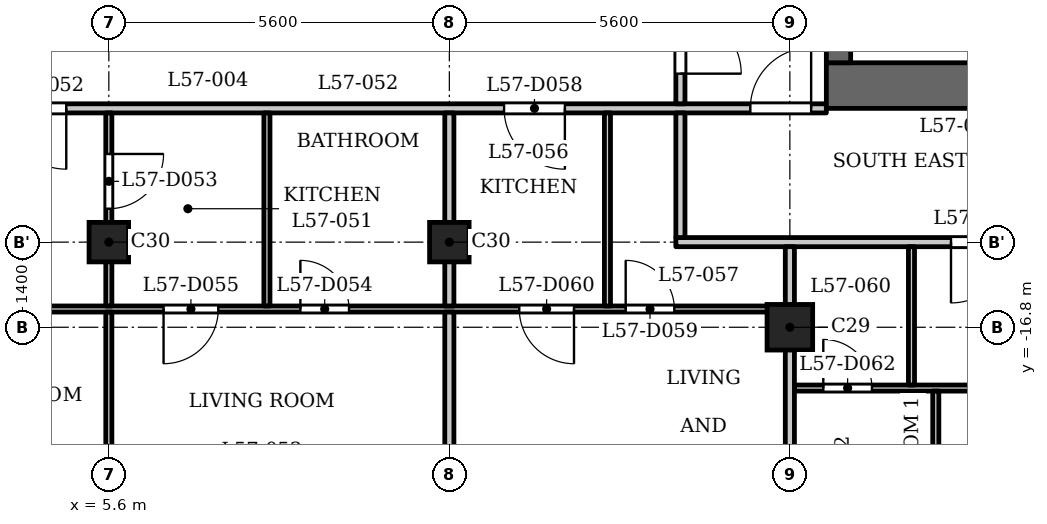
"""IFC4 building model, lengths in metres.
Left out: names, types, materials, properties, quantities, classifications, styles, units other than length and angle.
Written with IfcOpenShell. Run it as: python <this file> out.ifc"""

import sys

from ifc_helpers import new_model, si_unit, direction, frame, frame_2d, origin, origin_2d, place, context, subcontext, project, spatial, rectangle, extrude, element, fill, save


model = new_model("IFC4")
c1 = context("Model", 3, precision=1e-05, world=origin(), true_north=direction((0.0, 1.0)))
c2 = subcontext(c1, "Body", "Model", "MODEL_VIEW")
j1 = project(units=[si_unit("LENGTHUNIT", "METRE"), si_unit("PLANEANGLEUNIT", "RADIAN")], contexts=[c1])
p1 = place(None, origin())
s1 = spatial("IfcSite", under=j1, at=p1, CompositionType="ELEMENT")
p2 = place(p1, origin())
s2 = spatial("IfcBuilding", under=s1, at=p2, CompositionType="ELEMENT")
p3 = place(p2, frame((0.0, 0.0, 220.4)))
s3 = spatial("IfcBuildingStorey", under=s2, at=p3, CompositionType="ELEMENT", Elevation=220.4)
p4 = place(p3, frame((16.8, -16.8, 0.0), z_axis=(0.0, 0.0, 1.0), x_axis=(1.0, 0.0, 0.0)))
e1 = element("IfcColumn", 1, at=p4, inside=s3, PredefinedType="COLUMN", context=c2, shape_type="SweptSolid", body=[
    extrude(rectangle(XDim=0.75, YDim=0.75, at=origin_2d()), origin(), (0.0, 0.0, 1.0), 3.5),
])
for number, where, z_axis, x_axis in (
    (2, (5.6, -15.4, 0.0), (0.0, 0.0, 1.0), (1.0, 0.0, 0.0)),
    (3, (11.2, -15.4, 0.0), (0.0, 0.0, 1.0), (1.0, 0.0, 0.0)),
):
    element("IfcColumn", number, at=place(p3, frame(where, z_axis=z_axis, x_axis=x_axis)), inside=s3, PredefinedType="COLUMN", context=c2, shape_type="SweptSolid", body=[
        extrude(rectangle(XDim=0.65, YDim=0.65, at=origin_2d()), origin(), (0.0, 0.0, 1.0), 3.5),
    ])
p5 = place(p3, frame((17.4, -12.825, 0.0), z_axis=(0.0, 0.0, 1.0), x_axis=(1.0, 0.0, 0.0)))
e4 = element("IfcWall", 4, at=p5, inside=s3, PredefinedType="SHEAR", context=c2, shape_type="SweptSolid", body=[
    extrude(rectangle(XDim=7.6, YDim=0.75, at=frame_2d((3.8, 0.0))), origin(), (0.0, 0.0, 1.0), 3.2),
])
p6 = place(p3, frame((17.6, -12.45, 0.0), z_axis=(0.0, 0.0, 1.0), x_axis=(0.0, 1.0, 0.0)))
e5 = element("IfcWall", 5, at=p6, inside=s3, PredefinedType="SHEAR", context=c2, shape_type="SweptSolid", body=[
    extrude(rectangle(XDim=24.9, YDim=0.4, at=frame_2d((12.45, 0.0))), origin(), (0.0, 0.0, 1.0), 3.2),
])
p7 = place(p6, frame((6.85, 0.0, 0.0)))
e6 = element("IfcOpeningElement", 6, at=p7, cuts=e5, PredefinedType="OPENING", context=c2, shape_type="SweptSolid", body=[
    extrude(rectangle(XDim=0.9, YDim=2.1, at=frame_2d((0.45, 1.05))), frame((0.0, 0.21, 0.0), z_axis=(0.0, -1.0, 0.0), x_axis=(1.0, 0.0, 0.0)), (0.0, 0.0, 1.0), 0.42),
])
p8 = place(p6, frame((10.45, 0.0, 0.0)))
e7 = element("IfcOpeningElement", 7, at=p8, cuts=e5, PredefinedType="OPENING", context=c2, shape_type="SweptSolid", body=[
    extrude(rectangle(XDim=0.9, YDim=2.1, at=frame_2d((0.45, 1.05))), frame((0.0, 0.21, 0.0), z_axis=(0.0, -1.0, 0.0), x_axis=(1.0, 0.0, 0.0)), (0.0, 0.0, 1.0), 0.42),
])
p9 = place(p6, frame((15.6, 0.0, 0.0)))
e8 = element("IfcOpeningElement", 8, at=p9, cuts=e5, PredefinedType="OPENING", context=c2, shape_type="SweptSolid", body=[
    extrude(rectangle(XDim=1.1, YDim=2.1, at=frame_2d((0.55, 1.05))), frame((0.0, 0.21, 0.0), z_axis=(0.0, -1.0, 0.0), x_axis=(1.0, 0.0, 0.0)), (0.0, 0.0, 1.0), 0.42),
])
p10 = place(p6, frame((18.0, 0.0, 0.0)))
e9 = element("IfcOpeningElement", 9, at=p10, cuts=e5, PredefinedType="OPENING", context=c2, shape_type="SweptSolid", body=[
    extrude(rectangle(XDim=1.1, YDim=2.1, at=frame_2d((0.55, 1.05))), frame((0.0, 0.21, 0.0), z_axis=(0.0, -1.0, 0.0), x_axis=(1.0, 0.0, 0.0)), (0.0, 0.0, 1.0), 0.42),
])
p11 = place(p6, frame((23.025, 0.0, 0.0)))
e10 = element("IfcOpeningElement", 10, at=p11, cuts=e5, PredefinedType="OPENING", context=c2, shape_type="SweptSolid", body=[
    extrude(rectangle(XDim=1.1, YDim=2.1, at=frame_2d((0.55, 1.05))), frame((0.0, 0.21, 0.0), z_axis=(0.0, -1.0, 0.0), x_axis=(1.0, 0.0, 0.0)), (0.0, 0.0, 1.0), 0.42),
])
p12 = place(p6, frame((0.775, 0.0, 0.0)))
e11 = element("IfcOpeningElement", 11, at=p12, cuts=e5, PredefinedType="OPENING", context=c2, shape_type="SweptSolid", body=[
    extrude(rectangle(XDim=1.1, YDim=2.1, at=frame_2d((0.55, 1.05))), frame((0.0, 0.21, 0.0), z_axis=(0.0, -1.0, 0.0), x_axis=(1.0, 0.0, 0.0)), (0.0, 0.0, 1.0), 0.42),
])
p13 = place(p6, frame((12.925, 0.0, 0.0)))
e12 = element("IfcOpeningElement", 12, at=p13, cuts=e5, PredefinedType="OPENING", context=c2, shape_type="SweptSolid", body=[
    extrude(rectangle(XDim=1.8, YDim=2.1, at=frame_2d((0.9, 1.05))), frame((0.0, 0.21, 0.0), z_axis=(0.0, -1.0, 0.0), x_axis=(1.0, 0.0, 0.0)), (0.0, 0.0, 1.0), 0.42),
])
p14 = place(p3, frame((16.875, -17.8, 0.0), z_axis=(0.0, 0.0, 1.0), x_axis=(1.0, 0.0, 0.0)))
e13 = element("IfcWall", 13, at=p14, inside=s3, PredefinedType="PARTITIONING", context=c2, shape_type="SweptSolid", body=[
    extrude(rectangle(XDim=6.719, YDim=0.1, at=frame_2d((3.359, 0.0))), origin(), (0.0, 0.0, 1.0), 3.2),
])
p15 = place(p14, frame((0.475, 0.0, 0.0)))
e14 = element("IfcOpeningElement", 14, at=p15, cuts=e13, PredefinedType="OPENING", context=c2, shape_type="SweptSolid", body=[
    extrude(rectangle(XDim=0.8, YDim=2.1, at=frame_2d((0.4, 1.05))), frame((0.0, 0.06, 0.0), z_axis=(0.0, -1.0, 0.0), x_axis=(1.0, 0.0, 0.0)), (0.0, 0.0, 1.0), 0.12),
])
p16 = place(p14, frame((3.725, 0.0, 0.0)))
e15 = element("IfcOpeningElement", 15, at=p16, cuts=e13, PredefinedType="OPENING", context=c2, shape_type="SweptSolid", body=[
    extrude(rectangle(XDim=0.9, YDim=2.1, at=frame_2d((0.45, 1.05))), frame((0.0, 0.06, 0.0), z_axis=(0.0, -1.0, 0.0), x_axis=(1.0, 0.0, 0.0)), (0.0, 0.0, 1.0), 0.12),
])
p17 = place(p3, frame((-16.725, -16.5, 0.0), z_axis=(0.0, 0.0, 1.0), x_axis=(1.0, 0.0, 0.0)))
e16 = element("IfcWall", 16, at=p17, inside=s3, PredefinedType="PARTITIONING", context=c2, shape_type="SweptSolid", body=[
    extrude(rectangle(XDim=33.45, YDim=0.1, at=frame_2d((16.725, 0.0))), origin(), (0.0, 0.0, 1.0), 3.2),
])
p18 = place(p17, frame((0.675, 0.0, 0.0)))
e17 = element("IfcOpeningElement", 17, at=p18, cuts=e16, PredefinedType="OPENING", context=c2, shape_type="SweptSolid", body=[
    extrude(rectangle(XDim=0.8, YDim=2.1, at=frame_2d((0.4, 1.05))), frame((0.0, 0.06, 0.0), z_axis=(0.0, -1.0, 0.0), x_axis=(1.0, 0.0, 0.0)), (0.0, 0.0, 1.0), 0.12),
])
p19 = place(p17, frame((2.775, 0.0, 0.0)))
e18 = element("IfcOpeningElement", 18, at=p19, cuts=e16, PredefinedType="OPENING", context=c2, shape_type="SweptSolid", body=[
    extrude(rectangle(XDim=0.9, YDim=2.1, at=frame_2d((0.45, 1.05))), frame((0.0, 0.06, 0.0), z_axis=(0.0, -1.0, 0.0), x_axis=(1.0, 0.0, 0.0)), (0.0, 0.0, 1.0), 0.12),
])
p20 = place(p17, frame((6.425, 0.0, 0.0)))
e19 = element("IfcOpeningElement", 19, at=p20, cuts=e16, PredefinedType="OPENING", context=c2, shape_type="SweptSolid", body=[
    extrude(rectangle(XDim=0.8, YDim=2.1, at=frame_2d((0.4, 1.05))), frame((0.0, 0.06, 0.0), z_axis=(0.0, -1.0, 0.0), x_axis=(1.0, 0.0, 0.0)), (0.0, 0.0, 1.0), 0.12),
])
p21 = place(p17, frame((8.775, 0.0, 0.0)))
e20 = element("IfcOpeningElement", 20, at=p21, cuts=e16, PredefinedType="OPENING", context=c2, shape_type="SweptSolid", body=[
    extrude(rectangle(XDim=0.9, YDim=2.1, at=frame_2d((0.45, 1.05))), frame((0.0, 0.06, 0.0), z_axis=(0.0, -1.0, 0.0), x_axis=(1.0, 0.0, 0.0)), (0.0, 0.0, 1.0), 0.12),
])
p22 = place(p17, frame((12.525, 0.0, 0.0)))
e21 = element("IfcOpeningElement", 21, at=p22, cuts=e16, PredefinedType="OPENING", context=c2, shape_type="SweptSolid", body=[
    extrude(rectangle(XDim=0.9, YDim=2.1, at=frame_2d((0.45, 1.05))), frame((0.0, 0.06, 0.0), z_axis=(0.0, -1.0, 0.0), x_axis=(1.0, 0.0, 0.0)), (0.0, 0.0, 1.0), 0.12),
])
p23 = place(p17, frame((14.775, 0.0, 0.0)))
e22 = element("IfcOpeningElement", 22, at=p23, cuts=e16, PredefinedType="OPENING", context=c2, shape_type="SweptSolid", body=[
    extrude(rectangle(XDim=0.9, YDim=2.1, at=frame_2d((0.45, 1.05))), frame((0.0, 0.06, 0.0), z_axis=(0.0, -1.0, 0.0), x_axis=(1.0, 0.0, 0.0)), (0.0, 0.0, 1.0), 0.12),
])
p24 = place(p17, frame((25.475, 0.0, 0.0)))
e23 = element("IfcOpeningElement", 23, at=p24, cuts=e16, PredefinedType="OPENING", context=c2, shape_type="SweptSolid", body=[
    extrude(rectangle(XDim=0.8, YDim=2.1, at=frame_2d((0.4, 1.05))), frame((0.0, 0.06, 0.0), z_axis=(0.0, -1.0, 0.0), x_axis=(1.0, 0.0, 0.0)), (0.0, 0.0, 1.0), 0.12),
])
p25 = place(p17, frame((23.225, 0.0, 0.0)))
e24 = element("IfcOpeningElement", 24, at=p25, cuts=e16, PredefinedType="OPENING", context=c2, shape_type="SweptSolid", body=[
    extrude(rectangle(XDim=0.9, YDim=2.1, at=frame_2d((0.45, 1.05))), frame((0.0, 0.06, 0.0), z_axis=(0.0, -1.0, 0.0), x_axis=(1.0, 0.0, 0.0)), (0.0, 0.0, 1.0), 0.12),
])
p26 = place(p17, frame((17.875, 0.0, 0.0)))
e25 = element("IfcOpeningElement", 25, at=p26, cuts=e16, PredefinedType="OPENING", context=c2, shape_type="SweptSolid", body=[
    extrude(rectangle(XDim=0.9, YDim=2.1, at=frame_2d((0.45, 1.05))), frame((0.0, 0.06, 0.0), z_axis=(0.0, -1.0, 0.0), x_axis=(1.0, 0.0, 0.0)), (0.0, 0.0, 1.0), 0.12),
])
p27 = place(p17, frame((19.975, 0.0, 0.0)))
e26 = element("IfcOpeningElement", 26, at=p27, cuts=e16, PredefinedType="OPENING", context=c2, shape_type="SweptSolid", body=[
    extrude(rectangle(XDim=0.9, YDim=2.1, at=frame_2d((0.45, 1.05))), frame((0.0, 0.06, 0.0), z_axis=(0.0, -1.0, 0.0), x_axis=(1.0, 0.0, 0.0)), (0.0, 0.0, 1.0), 0.12),
])
p28 = place(p17, frame((30.825, 0.0, 0.0)))
e27 = element("IfcOpeningElement", 27, at=p28, cuts=e16, PredefinedType="OPENING", context=c2, shape_type="SweptSolid", body=[
    extrude(rectangle(XDim=0.8, YDim=2.1, at=frame_2d((0.4, 1.05))), frame((0.0, 0.06, 0.0), z_axis=(0.0, -1.0, 0.0), x_axis=(1.0, 0.0, 0.0)), (0.0, 0.0, 1.0), 0.12),
])
p29 = place(p17, frame((29.075, 0.0, 0.0)))
e28 = element("IfcOpeningElement", 28, at=p29, cuts=e16, PredefinedType="OPENING", context=c2, shape_type="SweptSolid", body=[
    extrude(rectangle(XDim=0.9, YDim=2.1, at=frame_2d((0.45, 1.05))), frame((0.0, 0.06, 0.0), z_axis=(0.0, -1.0, 0.0), x_axis=(1.0, 0.0, 0.0)), (0.0, 0.0, 1.0), 0.12),
])
p30 = place(p3, frame((14.925, -15.4, 0.0), z_axis=(0.0, 0.0, 1.0), x_axis=(1.0, 0.0, 0.0)))
e29 = element("IfcWall", 29, at=p30, inside=s3, PredefinedType="PARTITIONING", context=c2, shape_type="SweptSolid", body=[
    extrude(rectangle(XDim=9.759, YDim=0.15, at=frame_2d((4.879, 0.0))), origin(), (0.0, 0.0, 1.0), 3.2),
])
p31 = place(p30, frame((4.525, 0.0, 0.0)))
e30 = element("IfcOpeningElement", 30, at=p31, cuts=e29, PredefinedType="OPENING", context=c2, shape_type="SweptSolid", body=[
    extrude(rectangle(XDim=1.0, YDim=2.1, at=frame_2d((0.5, 1.05))), frame((0.0, 0.085, 0.0), z_axis=(0.0, -1.0, 0.0), x_axis=(1.0, 0.0, 0.0)), (0.0, 0.0, 1.0), 0.17),
])
p32 = place(p3, frame((-17.4, -13.2, 0.0), z_axis=(0.0, 0.0, 1.0), x_axis=(1.0, 0.0, 0.0)))
e31 = element("IfcWall", 31, at=p32, inside=s3, PredefinedType="PARTITIONING", context=c2, shape_type="SweptSolid", body=[
    extrude(rectangle(XDim=34.8, YDim=0.15, at=frame_2d((17.4, 0.0))), origin(), (0.0, 0.0, 1.0), 3.2),
])
p33 = place(p32, frame((0.15, 0.0, 0.0)))
e32 = element("IfcOpeningElement", 32, at=p33, cuts=e31, PredefinedType="OPENING", context=c2, shape_type="SweptSolid", body=[
    extrude(rectangle(XDim=1.0, YDim=2.1, at=frame_2d((0.5, 1.05))), frame((0.0, 0.085, 0.0), z_axis=(0.0, -1.0, 0.0), x_axis=(1.0, 0.0, 0.0)), (0.0, 0.0, 1.0), 0.17),
])
p34 = place(p32, frame((33.55, 0.0, 0.0)))
e33 = element("IfcOpeningElement", 33, at=p34, cuts=e31, PredefinedType="OPENING", context=c2, shape_type="SweptSolid", body=[
    extrude(rectangle(XDim=1.0, YDim=2.1, at=frame_2d((0.5, 1.05))), frame((0.0, 0.085, 0.0), z_axis=(0.0, -1.0, 0.0), x_axis=(1.0, 0.0, 0.0)), (0.0, 0.0, 1.0), 0.17),
])
p35 = place(p32, frame((3.7, 0.0, 0.0)))
e34 = element("IfcOpeningElement", 34, at=p35, cuts=e31, PredefinedType="OPENING", context=c2, shape_type="SweptSolid", body=[
    extrude(rectangle(XDim=1.0, YDim=2.1, at=frame_2d((0.5, 1.05))), frame((0.0, 0.085, 0.0), z_axis=(0.0, -1.0, 0.0), x_axis=(1.0, 0.0, 0.0)), (0.0, 0.0, 1.0), 0.17),
])
p36 = place(p32, frame((15.7, 0.0, 0.0)))
e35 = element("IfcOpeningElement", 35, at=p36, cuts=e31, PredefinedType="OPENING", context=c2, shape_type="SweptSolid", body=[
    extrude(rectangle(XDim=1.0, YDim=2.1, at=frame_2d((0.5, 1.05))), frame((0.0, 0.085, 0.0), z_axis=(0.0, -1.0, 0.0), x_axis=(1.0, 0.0, 0.0)), (0.0, 0.0, 1.0), 0.17),
])
p37 = place(p32, frame((21.3, 0.0, 0.0)))
e36 = element("IfcOpeningElement", 36, at=p37, cuts=e31, PredefinedType="OPENING", context=c2, shape_type="SweptSolid", body=[
    extrude(rectangle(XDim=1.0, YDim=2.1, at=frame_2d((0.5, 1.05))), frame((0.0, 0.085, 0.0), z_axis=(0.0, -1.0, 0.0), x_axis=(1.0, 0.0, 0.0)), (0.0, 0.0, 1.0), 0.17),
])
p38 = place(p32, frame((29.5, 0.0, 0.0)))
e37 = element("IfcOpeningElement", 37, at=p38, cuts=e31, PredefinedType="OPENING", context=c2, shape_type="SweptSolid", body=[
    extrude(rectangle(XDim=1.0, YDim=2.1, at=frame_2d((0.5, 1.05))), frame((0.0, 0.085, 0.0), z_axis=(0.0, -1.0, 0.0), x_axis=(1.0, 0.0, 0.0)), (0.0, 0.0, 1.0), 0.17),
])
p39 = place(p3, frame((5.6, -22.08, 0.0), z_axis=(0.0, 0.0, 1.0), x_axis=(0.0, 1.0, 0.0)))
e38 = element("IfcWall", 38, at=p39, inside=s3, PredefinedType="PARTITIONING", context=c2, shape_type="SweptSolid", body=[
    extrude(rectangle(XDim=5.53, YDim=0.1, at=frame_2d((2.765, 0.0))), origin(), (0.0, 0.0, 1.0), 3.2),
])
p40 = place(p3, frame((5.6, -16.45, 0.0), z_axis=(0.0, 0.0, 1.0), x_axis=(0.0, 1.0, 0.0)))
e39 = element("IfcWall", 39, at=p40, inside=s3, PredefinedType="PARTITIONING", context=c2, shape_type="SweptSolid", body=[
    extrude(rectangle(XDim=3.175, YDim=0.1, at=frame_2d((1.587, 0.0))), origin(), (0.0, 0.0, 1.0), 3.2),
])
p41 = place(p40, frame((1.6, 0.0, 0.0)))
e40 = element("IfcOpeningElement", 40, at=p41, cuts=e39, PredefinedType="OPENING", context=c2, shape_type="SweptSolid", body=[
    extrude(rectangle(XDim=0.9, YDim=2.1, at=frame_2d((0.45, 1.05))), frame((0.0, 0.06, 0.0), z_axis=(0.0, -1.0, 0.0), x_axis=(1.0, 0.0, 0.0)), (0.0, 0.0, 1.0), 0.12),
])
p42 = place(p3, frame((8.2, -16.45, 0.0), z_axis=(0.0, 0.0, 1.0), x_axis=(0.0, 1.0, 0.0)))
e41 = element("IfcWall", 41, at=p42, inside=s3, PredefinedType="PARTITIONING", context=c2, shape_type="SweptSolid", body=[
    extrude(rectangle(XDim=3.175, YDim=0.1, at=frame_2d((1.587, 0.0))), origin(), (0.0, 0.0, 1.0), 3.2),
])
p43 = place(p3, frame((11.2, -22.08, 0.0), z_axis=(0.0, 0.0, 1.0), x_axis=(0.0, 1.0, 0.0)))
e42 = element("IfcWall", 42, at=p43, inside=s3, PredefinedType="PARTITIONING", context=c2, shape_type="SweptSolid", body=[
    extrude(rectangle(XDim=5.53, YDim=0.15, at=frame_2d((2.765, 0.0))), origin(), (0.0, 0.0, 1.0), 3.2),
])
p44 = place(p3, frame((11.2, -16.45, 0.0), z_axis=(0.0, 0.0, 1.0), x_axis=(0.0, 1.0, 0.0)))
e43 = element("IfcWall", 43, at=p44, inside=s3, PredefinedType="PARTITIONING", context=c2, shape_type="SweptSolid", body=[
    extrude(rectangle(XDim=3.175, YDim=0.15, at=frame_2d((1.587, 0.0))), origin(), (0.0, 0.0, 1.0), 3.2),
])
p45 = place(p3, frame((13.8, -16.45, 0.0), z_axis=(0.0, 0.0, 1.0), x_axis=(0.0, 1.0, 0.0)))
e44 = element("IfcWall", 44, at=p45, inside=s3, PredefinedType="PARTITIONING", context=c2, shape_type="SweptSolid", body=[
    extrude(rectangle(XDim=3.175, YDim=0.1, at=frame_2d((1.587, 0.0))), origin(), (0.0, 0.0, 1.0), 3.2),
])
p46 = place(p3, frame((15.0, -15.325, 0.0), z_axis=(0.0, 0.0, 1.0), x_axis=(0.0, 1.0, 0.0)))
e45 = element("IfcWall", 45, at=p46, inside=s3, PredefinedType="PARTITIONING", context=c2, shape_type="SweptSolid", body=[
    extrude(rectangle(XDim=2.05, YDim=0.15, at=frame_2d((1.025, 0.0))), origin(), (0.0, 0.0, 1.0), 3.2),
])
p47 = place(p3, frame((15.0, -13.125, 0.0), z_axis=(0.0, 0.0, 1.0), x_axis=(0.0, 1.0, 0.0)))
e46 = element("IfcWall", 46, at=p47, inside=s3, PredefinedType="PARTITIONING", context=c2, shape_type="SweptSolid", body=[
    extrude(rectangle(XDim=6.356, YDim=0.15, at=frame_2d((3.178, 0.0))), origin(), (0.0, 0.0, 1.0), 3.2),
])
p48 = place(p47, frame((0.496, 0.0, 0.0)))
e47 = element("IfcOpeningElement", 47, at=p48, cuts=e46, PredefinedType="OPENING", context=c2, shape_type="SweptSolid", body=[
    extrude(rectangle(XDim=1.0, YDim=2.1, at=frame_2d((0.5, 1.05))), frame((0.0, 0.085, 0.0), z_axis=(0.0, -1.0, 0.0), x_axis=(1.0, 0.0, 0.0)), (0.0, 0.0, 1.0), 0.17),
])
p49 = place(p3, frame((16.8, -22.31, 0.0), z_axis=(0.0, 0.0, 1.0), x_axis=(0.0, 1.0, 0.0)))
e48 = element("IfcWall", 48, at=p49, inside=s3, PredefinedType="PARTITIONING", context=c2, shape_type="SweptSolid", body=[
    extrude(rectangle(XDim=6.835, YDim=0.15, at=frame_2d((3.417, 0.0))), origin(), (0.0, 0.0, 1.0), 2.55),
])
p50 = place(p3, frame((18.8, -17.75, 0.0), z_axis=(0.0, 0.0, 1.0), x_axis=(0.0, 1.0, 0.0)))
e49 = element("IfcWall", 49, at=p50, inside=s3, PredefinedType="PARTITIONING", context=c2, shape_type="SweptSolid", body=[
    extrude(rectangle(XDim=2.275, YDim=0.1, at=frame_2d((1.137, 0.0))), origin(), (0.0, 0.0, 1.0), 3.2),
])
p51 = place(p3, frame((19.2, -21.92, 0.0), z_axis=(0.0, 0.0, 1.0), x_axis=(0.0, 1.0, 0.0)))
e50 = element("IfcWall", 50, at=p51, inside=s3, PredefinedType="PARTITIONING", context=c2, shape_type="SweptSolid", body=[
    extrude(rectangle(XDim=4.07, YDim=0.1, at=frame_2d((2.035, 0.0))), origin(), (0.0, 0.0, 1.0), 3.2),
])
p52 = place(p51, frame((0.82, 0.0, 0.0)))
e51 = element("IfcOpeningElement", 51, at=p52, cuts=e50, PredefinedType="OPENING", context=c2, shape_type="SweptSolid", body=[
    extrude(rectangle(XDim=0.9, YDim=2.1, at=frame_2d((0.45, 1.05))), frame((0.0, 0.06, 0.0), z_axis=(0.0, -1.0, 0.0), x_axis=(1.0, 0.0, 0.0)), (0.0, 0.0, 1.0), 0.12),
])
p53 = place(p48, origin())
e52 = element("IfcDoor", 52, at=p53, inside=s3, OperationType="SINGLE_SWING_LEFT", PredefinedType="DOOR", context=c2, shape_type="SweptSolid", body=[
    extrude(rectangle(XDim=1.0, YDim=2.1, at=frame_2d((0.5, 1.05))), frame((0.0, 0.025, 0.0), z_axis=(0.0, -1.0, 0.0), x_axis=(1.0, 0.0, 0.0)), (0.0, 0.0, 1.0), 0.05),
])
fill(e47, e52)
p54 = place(p34, origin())
e53 = element("IfcDoor", 53, at=p54, inside=s3, OperationType="SINGLE_SWING_LEFT", PredefinedType="DOOR", context=c2, shape_type="SweptSolid", body=[
    extrude(rectangle(XDim=1.0, YDim=2.1, at=frame_2d((0.5, 1.05))), frame((0.0, 0.025, 0.0), z_axis=(0.0, -1.0, 0.0), x_axis=(1.0, 0.0, 0.0)), (0.0, 0.0, 1.0), 0.05),
])
fill(e33, e53)
p55 = place(p37, origin())
e54 = element("IfcDoor", 54, at=p55, inside=s3, OperationType="SINGLE_SWING_RIGHT", PredefinedType="DOOR", context=c2, shape_type="SweptSolid", body=[
    extrude(rectangle(XDim=1.0, YDim=2.1, at=frame_2d((0.5, 1.05))), frame((0.0, 0.025, 0.0), z_axis=(0.0, -1.0, 0.0), x_axis=(1.0, 0.0, 0.0)), (0.0, 0.0, 1.0), 0.05),
])
fill(e36, e54)
p56 = place(p41, origin())
e55 = element("IfcDoor", 55, at=p56, inside=s3, OperationType="SINGLE_SWING_RIGHT", PredefinedType="DOOR", context=c2, shape_type="SweptSolid", body=[
    extrude(rectangle(XDim=0.9, YDim=2.1, at=frame_2d((0.45, 1.05))), frame((0.0, 0.025, 0.0), z_axis=(0.0, -1.0, 0.0), x_axis=(1.0, 0.0, 0.0)), (0.0, 0.0, 1.0), 0.05),
])
fill(e40, e55)
p57 = place(p24, origin())
e56 = element("IfcDoor", 56, at=p57, inside=s3, OperationType="SINGLE_SWING_RIGHT", PredefinedType="DOOR", context=c2, shape_type="SweptSolid", body=[
    extrude(rectangle(XDim=0.8, YDim=2.1, at=frame_2d((0.4, 1.05))), frame((0.0, 0.025, 0.0), z_axis=(0.0, -1.0, 0.0), x_axis=(1.0, 0.0, 0.0)), (0.0, 0.0, 1.0), 0.05),
])
fill(e23, e56)
p58 = place(p25, origin())
e57 = element("IfcDoor", 57, at=p58, inside=s3, OperationType="SINGLE_SWING_LEFT", PredefinedType="DOOR", context=c2, shape_type="SweptSolid", body=[
    extrude(rectangle(XDim=0.9, YDim=2.1, at=frame_2d((0.45, 1.05))), frame((0.0, 0.025, 0.0), z_axis=(0.0, -1.0, 0.0), x_axis=(1.0, 0.0, 0.0)), (0.0, 0.0, 1.0), 0.05),
])
fill(e24, e57)
p59 = place(p38, origin())
e58 = element("IfcDoor", 58, at=p59, inside=s3, OperationType="SINGLE_SWING_RIGHT", PredefinedType="DOOR", context=c2, shape_type="SweptSolid", body=[
    extrude(rectangle(XDim=1.0, YDim=2.1, at=frame_2d((0.5, 1.05))), frame((0.0, 0.025, 0.0), z_axis=(0.0, -1.0, 0.0), x_axis=(1.0, 0.0, 0.0)), (0.0, 0.0, 1.0), 0.05),
])
fill(e37, e58)
p60 = place(p28, origin())
e59 = element("IfcDoor", 59, at=p60, inside=s3, OperationType="SINGLE_SWING_RIGHT", PredefinedType="DOOR", context=c2, shape_type="SweptSolid", body=[
    extrude(rectangle(XDim=0.8, YDim=2.1, at=frame_2d((0.4, 1.05))), frame((0.0, 0.025, 0.0), z_axis=(0.0, -1.0, 0.0), x_axis=(1.0, 0.0, 0.0)), (0.0, 0.0, 1.0), 0.05),
])
fill(e27, e59)
p61 = place(p29, origin())
e60 = element("IfcDoor", 60, at=p61, inside=s3, OperationType="SINGLE_SWING_RIGHT", PredefinedType="DOOR", context=c2, shape_type="SweptSolid", body=[
    extrude(rectangle(XDim=0.9, YDim=2.1, at=frame_2d((0.45, 1.05))), frame((0.0, 0.025, 0.0), z_axis=(0.0, -1.0, 0.0), x_axis=(1.0, 0.0, 0.0)), (0.0, 0.0, 1.0), 0.05),
])
fill(e28, e60)
p62 = place(p31, origin())
e61 = element("IfcDoor", 61, at=p62, inside=s3, OperationType="SINGLE_SWING_LEFT", PredefinedType="DOOR", context=c2, shape_type="SweptSolid", body=[
    extrude(rectangle(XDim=1.0, YDim=2.1, at=frame_2d((0.5, 1.05))), frame((0.0, 0.025, 0.0), z_axis=(0.0, -1.0, 0.0), x_axis=(1.0, 0.0, 0.0)), (0.0, 0.0, 1.0), 0.05),
])
fill(e30, e61)
p63 = place(p15, origin())
e62 = element("IfcDoor", 62, at=p63, inside=s3, OperationType="SINGLE_SWING_RIGHT", PredefinedType="DOOR", context=c2, shape_type="SweptSolid", body=[
    extrude(rectangle(XDim=0.8, YDim=2.1, at=frame_2d((0.4, 1.05))), frame((0.0, 0.025, 0.0), z_axis=(0.0, -1.0, 0.0), x_axis=(1.0, 0.0, 0.0)), (0.0, 0.0, 1.0), 0.05),
])
fill(e14, e62)
save(model, sys.argv[1])
